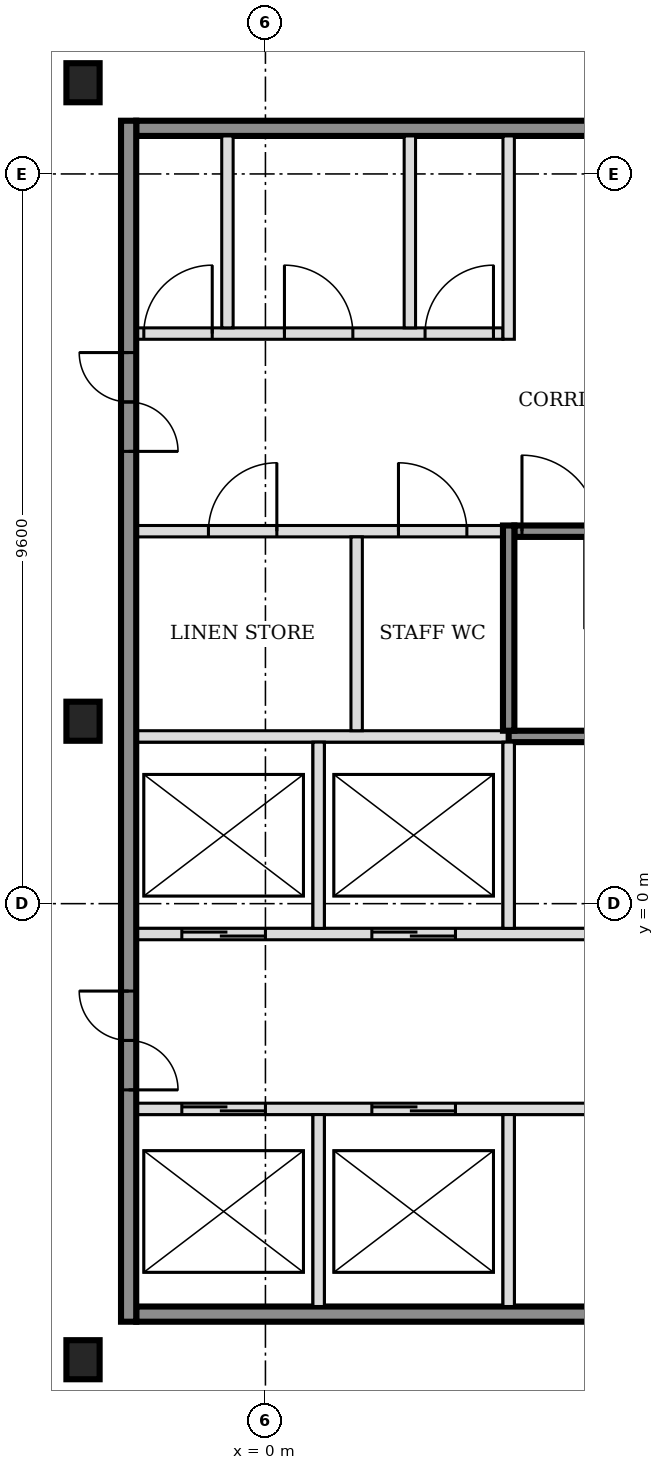
"""IFC4 building model, lengths in metres.
Left out: names, types, materials, properties, quantities, classifications, styles, units other than length and angle.
Written with IfcOpenShell. Run it as: python <this file> out.ifc"""

import sys

from ifc_helpers import new_model, si_unit, direction, frame, frame_2d, origin, origin_2d, place, context, subcontext, project, spatial, rectangle, i_section, extrude, element, fill, save


model = new_model("IFC4")
c1 = context("Model", 3, precision=1e-05, world=origin(), true_north=direction((0.0, 1.0)))
c2 = subcontext(c1, "Body", "Model", "MODEL_VIEW")
j1 = project(units=[si_unit("LENGTHUNIT", "METRE"), si_unit("PLANEANGLEUNIT", "RADIAN")], contexts=[c1])
p1 = place(None, origin())
s1 = spatial("IfcSite", under=j1, at=p1, CompositionType="ELEMENT")
p2 = place(p1, origin())
s2 = spatial("IfcBuilding", under=s1, at=p2, CompositionType="ELEMENT")
p3 = place(p2, frame((0.0, 0.0, 65.4)))
s3 = spatial("IfcBuildingStorey", under=s2, at=p3, CompositionType="ELEMENT", Elevation=65.4)
for number, where, z_axis, x_axis in (
    (1, (-2.4, -6.0, -0.15), (0.0, 0.0, 1.0), (1.0, 0.0, 0.0)),
    (2, (-2.4, 2.4, -0.15), (0.0, 0.0, 1.0), (1.0, 0.0, 0.0)),
    (3, (-2.4, 10.8, -0.15), (0.0, 0.0, 1.0), (1.0, 0.0, 0.0)),
):
    element("IfcColumn", number, at=place(p3, frame(where, z_axis=z_axis, x_axis=x_axis)), inside=s3, PredefinedType="COLUMN", context=c2, shape_type="SweptSolid", body=[
        extrude(i_section(OverallWidth=0.437, OverallDepth=0.514, WebThickness=0.061, FlangeThickness=0.097, FilletRadius=0.015, at=origin_2d()), origin(), (0.0, 0.0, 1.0), 3.6),
    ])
p4 = place(p3, frame((-1.7, -5.4, 0.0), z_axis=(0.0, 0.0, 1.0), x_axis=(1.0, 0.0, 0.0)))
e4 = element("IfcWall", 4, at=p4, inside=s3, PredefinedType="SOLIDWALL", context=c2, shape_type="SweptSolid", body=[
    extrude(rectangle(XDim=7.9, YDim=0.2, at=frame_2d((3.95, 0.0))), origin(), (0.0, 0.0, 1.0), 3.45),
])
p5 = place(p3, frame((-1.7, -2.7, 0.0), z_axis=(0.0, 0.0, 1.0), x_axis=(1.0, 0.0, 0.0)))
e5 = element("IfcWall", 5, at=p5, inside=s3, PredefinedType="SOLIDWALL", context=c2, shape_type="SweptSolid", body=[
    extrude(rectangle(XDim=7.9, YDim=0.15, at=frame_2d((3.95, 0.0))), origin(), (0.0, 0.0, 1.0), 3.45),
])
p6 = place(p5, frame((0.6, 0.0, 0.0)))
e6 = element("IfcOpeningElement", 6, at=p6, cuts=e5, PredefinedType="OPENING", context=c2, shape_type="SweptSolid", body=[
    extrude(rectangle(XDim=1.1, YDim=2.1, at=frame_2d((0.55, 1.05))), frame((0.0, 0.085, 0.0), z_axis=(0.0, -1.0, 0.0), x_axis=(1.0, 0.0, 0.0)), (0.0, 0.0, 1.0), 0.17),
])
p7 = place(p5, frame((3.1, 0.0, 0.0)))
e7 = element("IfcOpeningElement", 7, at=p7, cuts=e5, PredefinedType="OPENING", context=c2, shape_type="SweptSolid", body=[
    extrude(rectangle(XDim=1.1, YDim=2.1, at=frame_2d((0.55, 1.05))), frame((0.0, 0.085, 0.0), z_axis=(0.0, -1.0, 0.0), x_axis=(1.0, 0.0, 0.0)), (0.0, 0.0, 1.0), 0.17),
])
p8 = place(p3, frame((-1.7, -0.4, 0.0), z_axis=(0.0, 0.0, 1.0), x_axis=(1.0, 0.0, 0.0)))
e8 = element("IfcWall", 8, at=p8, inside=s3, PredefinedType="SOLIDWALL", context=c2, shape_type="SweptSolid", body=[
    extrude(rectangle(XDim=15.925, YDim=0.15, at=frame_2d((7.962, 0.0))), origin(), (0.0, 0.0, 1.0), 3.45),
])
p9 = place(p8, frame((0.6, 0.0, 0.0)))
e9 = element("IfcOpeningElement", 9, at=p9, cuts=e8, PredefinedType="OPENING", context=c2, shape_type="SweptSolid", body=[
    extrude(rectangle(XDim=1.1, YDim=2.1, at=frame_2d((0.55, 1.05))), frame((0.0, 0.085, 0.0), z_axis=(0.0, -1.0, 0.0), x_axis=(1.0, 0.0, 0.0)), (0.0, 0.0, 1.0), 0.17),
])
p10 = place(p8, frame((3.1, 0.0, 0.0)))
e10 = element("IfcOpeningElement", 10, at=p10, cuts=e8, PredefinedType="OPENING", context=c2, shape_type="SweptSolid", body=[
    extrude(rectangle(XDim=1.1, YDim=2.1, at=frame_2d((0.55, 1.05))), frame((0.0, 0.085, 0.0), z_axis=(0.0, -1.0, 0.0), x_axis=(1.0, 0.0, 0.0)), (0.0, 0.0, 1.0), 0.17),
])
p11 = place(p8, frame((11.575, 0.0, 0.0)))
e11 = element("IfcOpeningElement", 11, at=p11, cuts=e8, PredefinedType="OPENING", context=c2, shape_type="SweptSolid", body=[
    extrude(rectangle(XDim=1.2, YDim=2.1, at=frame_2d((0.6, 1.05))), frame((0.0, 0.085, 0.0), z_axis=(0.0, -1.0, 0.0), x_axis=(1.0, 0.0, 0.0)), (0.0, 0.0, 1.0), 0.17),
])
p12 = place(p8, frame((14.125, 0.0, 0.0)))
e12 = element("IfcOpeningElement", 12, at=p12, cuts=e8, PredefinedType="OPENING", context=c2, shape_type="SweptSolid", body=[
    extrude(rectangle(XDim=1.2, YDim=2.1, at=frame_2d((0.6, 1.05))), frame((0.0, 0.085, 0.0), z_axis=(0.0, -1.0, 0.0), x_axis=(1.0, 0.0, 0.0)), (0.0, 0.0, 1.0), 0.17),
])
p13 = place(p3, frame((-1.7, 2.2, 0.0), z_axis=(0.0, 0.0, 1.0), x_axis=(1.0, 0.0, 0.0)))
e13 = element("IfcWall", 13, at=p13, inside=s3, PredefinedType="SOLIDWALL", context=c2, shape_type="SweptSolid", body=[
    extrude(rectangle(XDim=4.9, YDim=0.15, at=frame_2d((2.45, 0.0))), origin(), (0.0, 0.0, 1.0), 3.45),
])
p14 = place(p3, frame((3.2, 2.2, 0.0), z_axis=(0.0, 0.0, 1.0), x_axis=(1.0, 0.0, 0.0)))
e14 = element("IfcWall", 14, at=p14, inside=s3, PredefinedType="SOLIDWALL", context=c2, shape_type="SweptSolid", body=[
    extrude(rectangle(XDim=6.5, YDim=0.15, at=frame_2d((3.25, 0.0))), origin(), (0.0, 0.0, 1.0), 3.45),
])
p15 = place(p3, frame((-1.7, 4.9, 0.0), z_axis=(0.0, 0.0, 1.0), x_axis=(1.0, 0.0, 0.0)))
e15 = element("IfcWall", 15, at=p15, inside=s3, PredefinedType="PARTITIONING", context=c2, shape_type="SweptSolid", body=[
    extrude(rectangle(XDim=4.825, YDim=0.15, at=frame_2d((2.413, 0.0))), origin(), (0.0, 0.0, 1.0), 3.45),
])
p16 = place(p15, frame((0.95, 0.0, 0.0)))
e16 = element("IfcOpeningElement", 16, at=p16, cuts=e15, PredefinedType="OPENING", context=c2, shape_type="SweptSolid", body=[
    extrude(rectangle(XDim=0.9, YDim=2.1, at=frame_2d((0.45, 1.05))), frame((0.0, 0.085, 0.0), z_axis=(0.0, -1.0, 0.0), x_axis=(1.0, 0.0, 0.0)), (0.0, 0.0, 1.0), 0.17),
])
p17 = place(p15, frame((3.45, 0.0, 0.0)))
e17 = element("IfcOpeningElement", 17, at=p17, cuts=e15, PredefinedType="OPENING", context=c2, shape_type="SweptSolid", body=[
    extrude(rectangle(XDim=0.9, YDim=2.1, at=frame_2d((0.45, 1.05))), frame((0.0, 0.085, 0.0), z_axis=(0.0, -1.0, 0.0), x_axis=(1.0, 0.0, 0.0)), (0.0, 0.0, 1.0), 0.17),
])
p18 = place(p3, frame((3.275, 4.9, 0.0), z_axis=(0.0, 0.0, 1.0), x_axis=(1.0, 0.0, 0.0)))
e18 = element("IfcWall", 18, at=p18, inside=s3, PredefinedType="SOLIDWALL", context=c2, shape_type="SweptSolid", body=[
    extrude(rectangle(XDim=6.425, YDim=0.15, at=frame_2d((3.212, 0.0))), origin(), (0.0, 0.0, 1.0), 3.45),
])
p19 = place(p18, frame((0.1, 0.0, 0.0)))
e19 = element("IfcOpeningElement", 19, at=p19, cuts=e18, PredefinedType="OPENING", context=c2, shape_type="SweptSolid", body=[
    extrude(rectangle(XDim=1.0, YDim=2.1, at=frame_2d((0.5, 1.05))), frame((0.0, 0.085, 0.0), z_axis=(0.0, -1.0, 0.0), x_axis=(1.0, 0.0, 0.0)), (0.0, 0.0, 1.0), 0.17),
])
p20 = place(p3, frame((-1.7, 7.5, 0.0), z_axis=(0.0, 0.0, 1.0), x_axis=(1.0, 0.0, 0.0)))
e20 = element("IfcWall", 20, at=p20, inside=s3, PredefinedType="PARTITIONING", context=c2, shape_type="SweptSolid", body=[
    extrude(rectangle(XDim=4.825, YDim=0.15, at=frame_2d((2.413, 0.0))), origin(), (0.0, 0.0, 1.0), 3.45),
])
p21 = place(p20, frame((0.1, 0.0, 0.0)))
e21 = element("IfcOpeningElement", 21, at=p21, cuts=e20, PredefinedType="OPENING", context=c2, shape_type="SweptSolid", body=[
    extrude(rectangle(XDim=0.9, YDim=2.1, at=frame_2d((0.45, 1.05))), frame((0.0, 0.085, 0.0), z_axis=(0.0, -1.0, 0.0), x_axis=(1.0, 0.0, 0.0)), (0.0, 0.0, 1.0), 0.17),
])
p22 = place(p20, frame((1.95, 0.0, 0.0)))
e22 = element("IfcOpeningElement", 22, at=p22, cuts=e20, PredefinedType="OPENING", context=c2, shape_type="SweptSolid", body=[
    extrude(rectangle(XDim=0.9, YDim=2.1, at=frame_2d((0.45, 1.05))), frame((0.0, 0.085, 0.0), z_axis=(0.0, -1.0, 0.0), x_axis=(1.0, 0.0, 0.0)), (0.0, 0.0, 1.0), 0.17),
])
p23 = place(p20, frame((3.8, 0.0, 0.0)))
e23 = element("IfcOpeningElement", 23, at=p23, cuts=e20, PredefinedType="OPENING", context=c2, shape_type="SweptSolid", body=[
    extrude(rectangle(XDim=0.9, YDim=2.1, at=frame_2d((0.45, 1.05))), frame((0.0, 0.085, 0.0), z_axis=(0.0, -1.0, 0.0), x_axis=(1.0, 0.0, 0.0)), (0.0, 0.0, 1.0), 0.17),
])
p24 = place(p3, frame((-1.7, 10.2, 0.0), z_axis=(0.0, 0.0, 1.0), x_axis=(1.0, 0.0, 0.0)))
e24 = element("IfcWall", 24, at=p24, inside=s3, PredefinedType="SOLIDWALL", context=c2, shape_type="SweptSolid", body=[
    extrude(rectangle(XDim=7.9, YDim=0.2, at=frame_2d((3.95, 0.0))), origin(), (0.0, 0.0, 1.0), 3.45),
])
p25 = place(p3, frame((-1.8, -5.5, 0.0), z_axis=(0.0, 0.0, 1.0), x_axis=(0.0, 1.0, 0.0)))
e25 = element("IfcWall", 25, at=p25, inside=s3, PredefinedType="SOLIDWALL", context=c2, shape_type="SweptSolid", body=[
    extrude(rectangle(XDim=15.8, YDim=0.2, at=frame_2d((7.9, 0.0))), origin(), (0.0, 0.0, 1.0), 3.45),
])
p26 = place(p25, frame((3.05, 0.0, 0.0)))
e26 = element("IfcOpeningElement", 26, at=p26, cuts=e25, PredefinedType="OPENING", context=c2, shape_type="SweptSolid", body=[
    extrude(rectangle(XDim=1.3, YDim=2.1, at=frame_2d((0.65, 1.05))), frame((0.0, 0.11, 0.0), z_axis=(0.0, -1.0, 0.0), x_axis=(1.0, 0.0, 0.0)), (0.0, 0.0, 1.0), 0.22),
])
p27 = place(p25, frame((11.45, 0.0, 0.0)))
e27 = element("IfcOpeningElement", 27, at=p27, cuts=e25, PredefinedType="OPENING", context=c2, shape_type="SweptSolid", body=[
    extrude(rectangle(XDim=1.3, YDim=2.1, at=frame_2d((0.65, 1.05))), frame((0.0, 0.11, 0.0), z_axis=(0.0, -1.0, 0.0), x_axis=(1.0, 0.0, 0.0)), (0.0, 0.0, 1.0), 0.22),
])
p28 = place(p3, frame((-0.5, 7.575, 0.0), z_axis=(0.0, 0.0, 1.0), x_axis=(0.0, 1.0, 0.0)))
e28 = element("IfcWall", 28, at=p28, inside=s3, PredefinedType="PARTITIONING", context=c2, shape_type="SweptSolid", body=[
    extrude(rectangle(XDim=2.525, YDim=0.15, at=frame_2d((1.263, 0.0))), origin(), (0.0, 0.0, 1.0), 3.45),
])
p29 = place(p3, frame((0.7, -5.3, 0.0), z_axis=(0.0, 0.0, 1.0), x_axis=(0.0, 1.0, 0.0)))
e29 = element("IfcWall", 29, at=p29, inside=s3, PredefinedType="SOLIDWALL", context=c2, shape_type="SweptSolid", body=[
    extrude(rectangle(XDim=2.525, YDim=0.15, at=frame_2d((1.263, 0.0))), origin(), (0.0, 0.0, 1.0), 3.45),
])
p30 = place(p3, frame((0.7, -0.325, 0.0), z_axis=(0.0, 0.0, 1.0), x_axis=(0.0, 1.0, 0.0)))
e30 = element("IfcWall", 30, at=p30, inside=s3, PredefinedType="SOLIDWALL", context=c2, shape_type="SweptSolid", body=[
    extrude(rectangle(XDim=2.45, YDim=0.15, at=frame_2d((1.225, 0.0))), origin(), (0.0, 0.0, 1.0), 3.45),
])
p31 = place(p3, frame((1.2, 2.275, 0.0), z_axis=(0.0, 0.0, 1.0), x_axis=(0.0, 1.0, 0.0)))
e31 = element("IfcWall", 31, at=p31, inside=s3, PredefinedType="PARTITIONING", context=c2, shape_type="SweptSolid", body=[
    extrude(rectangle(XDim=2.55, YDim=0.15, at=frame_2d((1.275, 0.0))), origin(), (0.0, 0.0, 1.0), 3.45),
])
p32 = place(p3, frame((1.9, 7.575, 0.0), z_axis=(0.0, 0.0, 1.0), x_axis=(0.0, 1.0, 0.0)))
e32 = element("IfcWall", 32, at=p32, inside=s3, PredefinedType="PARTITIONING", context=c2, shape_type="SweptSolid", body=[
    extrude(rectangle(XDim=2.525, YDim=0.15, at=frame_2d((1.263, 0.0))), origin(), (0.0, 0.0, 1.0), 3.45),
])
p33 = place(p3, frame((3.2, -5.3, 0.0), z_axis=(0.0, 0.0, 1.0), x_axis=(0.0, 1.0, 0.0)))
e33 = element("IfcWall", 33, at=p33, inside=s3, PredefinedType="SOLIDWALL", context=c2, shape_type="SweptSolid", body=[
    extrude(rectangle(XDim=2.525, YDim=0.15, at=frame_2d((1.263, 0.0))), origin(), (0.0, 0.0, 1.0), 3.45),
])
p34 = place(p3, frame((3.2, -0.325, 0.0), z_axis=(0.0, 0.0, 1.0), x_axis=(0.0, 1.0, 0.0)))
e34 = element("IfcWall", 34, at=p34, inside=s3, PredefinedType="SOLIDWALL", context=c2, shape_type="SweptSolid", body=[
    extrude(rectangle(XDim=2.45, YDim=0.15, at=frame_2d((1.225, 0.0))), origin(), (0.0, 0.0, 1.0), 3.45),
])
p35 = place(p3, frame((3.2, 2.275, 0.0), z_axis=(0.0, 0.0, 1.0), x_axis=(0.0, 1.0, 0.0)))
e35 = element("IfcWall", 35, at=p35, inside=s3, PredefinedType="SOLIDWALL", context=c2, shape_type="SweptSolid", body=[
    extrude(rectangle(XDim=2.7, YDim=0.15, at=frame_2d((1.35, 0.0))), origin(), (0.0, 0.0, 1.0), 3.45),
])
p36 = place(p3, frame((3.2, 7.425, 0.0), z_axis=(0.0, 0.0, 1.0), x_axis=(0.0, 1.0, 0.0)))
e36 = element("IfcWall", 36, at=p36, inside=s3, PredefinedType="PARTITIONING", context=c2, shape_type="SweptSolid", body=[
    extrude(rectangle(XDim=2.675, YDim=0.15, at=frame_2d((1.337, 0.0))), origin(), (0.0, 0.0, 1.0), 3.45),
])
p37 = place(p6, origin())
e37 = element("IfcDoor", 37, at=p37, inside=s3, OperationType="DOUBLE_DOOR_SLIDING", PredefinedType="DOOR", context=c2, shape_type="SweptSolid", body=[
    extrude(rectangle(XDim=1.1, YDim=2.1, at=frame_2d((0.55, 1.05))), frame((0.0, 0.025, 0.0), z_axis=(0.0, -1.0, 0.0), x_axis=(1.0, 0.0, 0.0)), (0.0, 0.0, 1.0), 0.05),
])
fill(e6, e37)
p38 = place(p7, origin())
e38 = element("IfcDoor", 38, at=p38, inside=s3, OperationType="DOUBLE_DOOR_SLIDING", PredefinedType="DOOR", context=c2, shape_type="SweptSolid", body=[
    extrude(rectangle(XDim=1.1, YDim=2.1, at=frame_2d((0.55, 1.05))), frame((0.0, 0.025, 0.0), z_axis=(0.0, -1.0, 0.0), x_axis=(1.0, 0.0, 0.0)), (0.0, 0.0, 1.0), 0.05),
])
fill(e7, e38)
p39 = place(p9, origin())
e39 = element("IfcDoor", 39, at=p39, inside=s3, OperationType="DOUBLE_DOOR_SLIDING", PredefinedType="DOOR", context=c2, shape_type="SweptSolid", body=[
    extrude(rectangle(XDim=1.1, YDim=2.1, at=frame_2d((0.55, 1.05))), frame((0.0, 0.025, 0.0), z_axis=(0.0, -1.0, 0.0), x_axis=(1.0, 0.0, 0.0)), (0.0, 0.0, 1.0), 0.05),
])
fill(e9, e39)
p40 = place(p10, origin())
e40 = element("IfcDoor", 40, at=p40, inside=s3, OperationType="DOUBLE_DOOR_SLIDING", PredefinedType="DOOR", context=c2, shape_type="SweptSolid", body=[
    extrude(rectangle(XDim=1.1, YDim=2.1, at=frame_2d((0.55, 1.05))), frame((0.0, 0.025, 0.0), z_axis=(0.0, -1.0, 0.0), x_axis=(1.0, 0.0, 0.0)), (0.0, 0.0, 1.0), 0.05),
])
fill(e10, e40)
p41 = place(p19, origin())
e41 = element("IfcDoor", 41, at=p41, inside=s3, OperationType="SINGLE_SWING_LEFT", PredefinedType="DOOR", context=c2, shape_type="SweptSolid", body=[
    extrude(rectangle(XDim=1.0, YDim=2.1, at=frame_2d((0.5, 1.05))), frame((0.0, 0.025, 0.0), z_axis=(0.0, -1.0, 0.0), x_axis=(1.0, 0.0, 0.0)), (0.0, 0.0, 1.0), 0.05),
])
fill(e19, e41)
p42 = place(p26, origin())
e42 = element("IfcDoor", 42, at=p42, inside=s3, OperationType="DOUBLE_DOOR_SINGLE_SWING", PredefinedType="DOOR", context=c2, shape_type="SweptSolid", body=[
    extrude(rectangle(XDim=1.3, YDim=2.1, at=frame_2d((0.65, 1.05))), frame((0.0, 0.025, 0.0), z_axis=(0.0, -1.0, 0.0), x_axis=(1.0, 0.0, 0.0)), (0.0, 0.0, 1.0), 0.05),
])
fill(e26, e42)
p43 = place(p27, origin())
e43 = element("IfcDoor", 43, at=p43, inside=s3, OperationType="DOUBLE_DOOR_SINGLE_SWING", PredefinedType="DOOR", context=c2, shape_type="SweptSolid", body=[
    extrude(rectangle(XDim=1.3, YDim=2.1, at=frame_2d((0.65, 1.05))), frame((0.0, 0.025, 0.0), z_axis=(0.0, -1.0, 0.0), x_axis=(1.0, 0.0, 0.0)), (0.0, 0.0, 1.0), 0.05),
])
fill(e27, e43)
p44 = place(p16, origin())
e44 = element("IfcDoor", 44, at=p44, inside=s3, OperationType="SINGLE_SWING_RIGHT", PredefinedType="DOOR", context=c2, shape_type="SweptSolid", body=[
    extrude(rectangle(XDim=0.9, YDim=2.1, at=frame_2d((0.45, 1.05))), frame((0.0, 0.025, 0.0), z_axis=(0.0, -1.0, 0.0), x_axis=(1.0, 0.0, 0.0)), (0.0, 0.0, 1.0), 0.05),
])
fill(e16, e44)
p45 = place(p17, origin())
e45 = element("IfcDoor", 45, at=p45, inside=s3, OperationType="SINGLE_SWING_LEFT", PredefinedType="DOOR", context=c2, shape_type="SweptSolid", body=[
    extrude(rectangle(XDim=0.9, YDim=2.1, at=frame_2d((0.45, 1.05))), frame((0.0, 0.025, 0.0), z_axis=(0.0, -1.0, 0.0), x_axis=(1.0, 0.0, 0.0)), (0.0, 0.0, 1.0), 0.05),
])
fill(e17, e45)
p46 = place(p21, origin())
e46 = element("IfcDoor", 46, at=p46, inside=s3, OperationType="SINGLE_SWING_RIGHT", PredefinedType="DOOR", context=c2, shape_type="SweptSolid", body=[
    extrude(rectangle(XDim=0.9, YDim=2.1, at=frame_2d((0.45, 1.05))), frame((0.0, 0.025, 0.0), z_axis=(0.0, -1.0, 0.0), x_axis=(1.0, 0.0, 0.0)), (0.0, 0.0, 1.0), 0.05),
])
fill(e21, e46)
p47 = place(p22, origin())
e47 = element("IfcDoor", 47, at=p47, inside=s3, OperationType="SINGLE_SWING_LEFT", PredefinedType="DOOR", context=c2, shape_type="SweptSolid", body=[
    extrude(rectangle(XDim=0.9, YDim=2.1, at=frame_2d((0.45, 1.05))), frame((0.0, 0.025, 0.0), z_axis=(0.0, -1.0, 0.0), x_axis=(1.0, 0.0, 0.0)), (0.0, 0.0, 1.0), 0.05),
])
fill(e22, e47)
p48 = place(p23, origin())
e48 = element("IfcDoor", 48, at=p48, inside=s3, OperationType="SINGLE_SWING_RIGHT", PredefinedType="DOOR", context=c2, shape_type="SweptSolid", body=[
    extrude(rectangle(XDim=0.9, YDim=2.1, at=frame_2d((0.45, 1.05))), frame((0.0, 0.025, 0.0), z_axis=(0.0, -1.0, 0.0), x_axis=(1.0, 0.0, 0.0)), (0.0, 0.0, 1.0), 0.05),
])
fill(e23, e48)
save(model, sys.argv[1])
